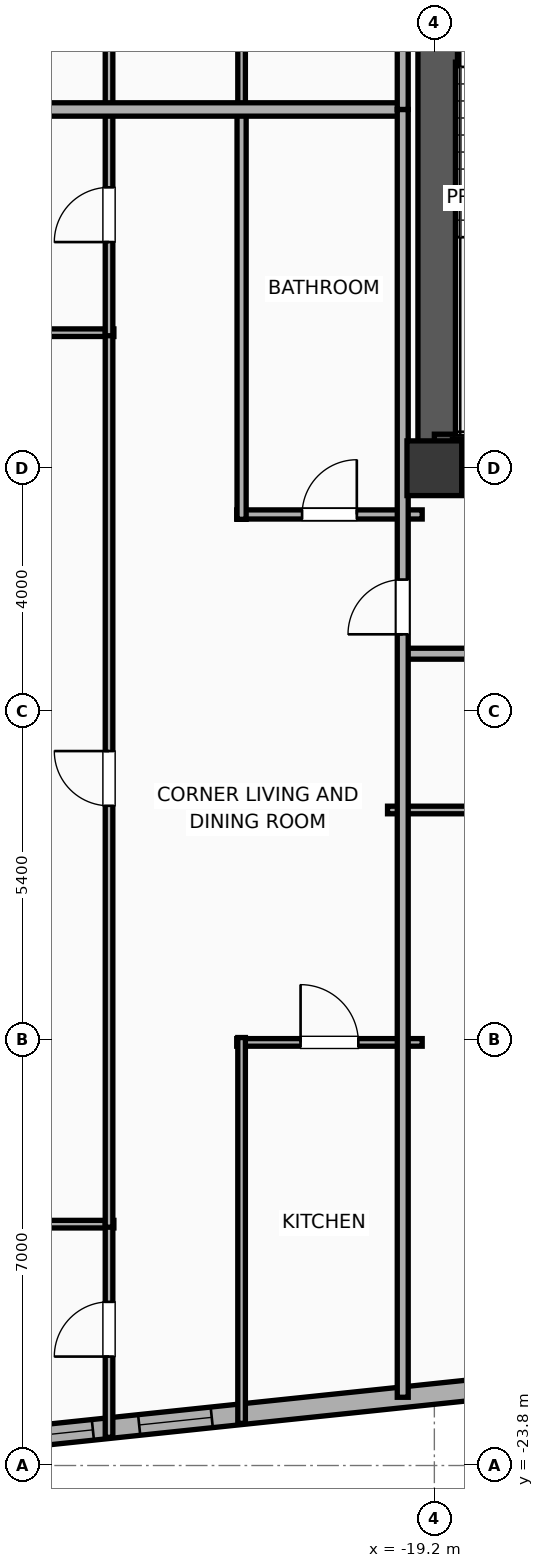
"""IFC4 building model, lengths in metres.
Left out: names, types, materials, properties, quantities, classifications, styles, units other than length and angle.
Written with IfcOpenShell. Run it as: python <this file> out.ifc"""

import sys

from ifc_helpers import new_model, si_unit, direction, frame, frame_2d, origin, origin_2d, place, context, subcontext, project, spatial, rectangle, extrude, element, fill, save


model = new_model("IFC4")
c1 = context("Model", 3, precision=1e-05, world=origin(), true_north=direction((0.0, 1.0)))
c2 = subcontext(c1, "Body", "Model", "MODEL_VIEW")
j1 = project(units=[si_unit("LENGTHUNIT", "METRE"), si_unit("PLANEANGLEUNIT", "RADIAN")], contexts=[c1])
p1 = place(None, origin())
s1 = spatial("IfcSite", under=j1, at=p1, CompositionType="ELEMENT")
p2 = place(p1, origin())
s2 = spatial("IfcBuilding", under=s1, at=p2, CompositionType="ELEMENT")
p3 = place(p2, frame((0.0, 0.0, 156.0)))
s3 = spatial("IfcBuildingStorey", under=s2, at=p3, CompositionType="ELEMENT", Elevation=156.0)
p4 = place(p3, frame((-19.2, -7.4, 0.0), z_axis=(0.0, 0.0, 1.0), x_axis=(1.0, 0.0, 0.0)))
e1 = element("IfcColumn", 1, at=p4, inside=s3, PredefinedType="COLUMN", context=c2, shape_type="SweptSolid", body=[
    extrude(rectangle(XDim=0.9, YDim=0.9, at=origin_2d()), origin(), (0.0, 0.0, 1.0), 3.9),
])
p5 = place(p3, frame((-19.425, -7.4, 0.0), z_axis=(0.0, 0.0, 1.0), x_axis=(1.0, 0.0, 0.0)))
e2 = element("IfcWall", 2, at=p5, inside=s3, PredefinedType="SHEAR", context=c2, shape_type="SweptSolid", body=[
    extrude(rectangle(XDim=7.25, YDim=0.45, at=frame_2d((3.625, 0.0))), origin(), (0.0, 0.0, 1.0), 3.65),
])
p6 = place(p3, frame((-19.145, -7.4, 0.0), z_axis=(0.0, 0.0, 1.0), x_axis=(0.0, 1.0, 0.0)))
e3 = element("IfcWall", 3, at=p6, inside=s3, PredefinedType="SHEAR", context=c2, shape_type="SweptSolid", body=[
    extrude(rectangle(XDim=14.8, YDim=0.65, at=frame_2d((7.4, 0.0))), origin(), (0.0, 0.0, 1.0), 3.65),
])
p7 = place(p3, frame((-19.2, -6.965, 0.0), z_axis=(0.0, 0.0, 1.0), x_axis=(1.0, 0.0, 0.0)))
e4 = element("IfcWall", 4, at=p7, inside=s3, PredefinedType="SOLIDWALL", context=c2, shape_type="SweptSolid", body=[
    extrude(rectangle(XDim=3.46, YDim=0.25, at=frame_2d((1.73, 0.0))), origin(), (0.0, 0.0, 1.0), 3.65),
])
p8 = place(p3, frame((24.756, -18.003, 0.0), z_axis=(0.0, 0.0, 1.0), x_axis=(-0.99452160744, -0.104531202687, 0.0)))
e5 = element("IfcWall", 5, at=p8, inside=s3, PredefinedType="ELEMENTEDWALL", context=c2, shape_type="SweptSolid", body=[
    extrude(rectangle(XDim=51.967, YDim=0.34, at=frame_2d((25.983, 0.0))), origin(), (0.0, 0.0, 1.0), 3.65),
])
p9 = place(p8, frame((25.633, 0.0, 0.75)))
e6 = element("IfcOpeningElement", 6, at=p9, cuts=e5, PredefinedType="OPENING", context=c2, shape_type="SweptSolid", body=[
    extrude(rectangle(XDim=2.4, YDim=2.1, at=frame_2d((1.2, 1.05))), frame((0.0, 0.18, 0.0), z_axis=(0.0, -1.0, 0.0), x_axis=(1.0, 0.0, 0.0)), (0.0, 0.0, 1.0), 0.36),
])
p10 = place(p8, frame((42.369, 0.0, 0.75)))
e7 = element("IfcOpeningElement", 7, at=p10, cuts=e5, PredefinedType="OPENING", context=c2, shape_type="SweptSolid", body=[
    extrude(rectangle(XDim=1.2, YDim=2.05, at=frame_2d((0.6, 1.025))), frame((0.0, 0.18, 0.0), z_axis=(0.0, -1.0, 0.0), x_axis=(1.0, 0.0, 0.0)), (0.0, 0.0, 1.0), 0.36),
])
p11 = place(p8, frame((34.085, 0.0, 0.75)))
e8 = element("IfcOpeningElement", 8, at=p11, cuts=e5, PredefinedType="OPENING", context=c2, shape_type="SweptSolid", body=[
    extrude(rectangle(XDim=1.2, YDim=2.05, at=frame_2d((0.6, 1.025))), frame((0.0, 0.18, 0.0), z_axis=(0.0, -1.0, 0.0), x_axis=(1.0, 0.0, 0.0)), (0.0, 0.0, 1.0), 0.36),
])
p12 = place(p8, frame((36.993, 0.0, 0.75)))
e9 = element("IfcOpeningElement", 9, at=p12, cuts=e5, PredefinedType="OPENING", context=c2, shape_type="SweptSolid", body=[
    extrude(rectangle(XDim=1.2, YDim=2.05, at=frame_2d((0.6, 1.025))), frame((0.0, 0.18, 0.0), z_axis=(0.0, -1.0, 0.0), x_axis=(1.0, 0.0, 0.0)), (0.0, 0.0, 1.0), 0.36),
])
p13 = place(p8, frame((14.397, 0.0, 0.75)))
e10 = element("IfcOpeningElement", 10, at=p13, cuts=e5, PredefinedType="OPENING", context=c2, shape_type="SweptSolid", body=[
    extrude(rectangle(XDim=1.2, YDim=2.05, at=frame_2d((0.6, 1.025))), frame((0.0, 0.18, 0.0), z_axis=(0.0, -1.0, 0.0), x_axis=(1.0, 0.0, 0.0)), (0.0, 0.0, 1.0), 0.36),
])
p14 = place(p8, frame((11.489, 0.0, 0.75)))
e11 = element("IfcOpeningElement", 11, at=p14, cuts=e5, PredefinedType="OPENING", context=c2, shape_type="SweptSolid", body=[
    extrude(rectangle(XDim=1.2, YDim=2.05, at=frame_2d((0.6, 1.025))), frame((0.0, 0.18, 0.0), z_axis=(0.0, -1.0, 0.0), x_axis=(1.0, 0.0, 0.0)), (0.0, 0.0, 1.0), 0.36),
])
p15 = place(p8, frame((8.521, 0.0, 0.75)))
e12 = element("IfcOpeningElement", 12, at=p15, cuts=e5, PredefinedType="OPENING", context=c2, shape_type="SweptSolid", body=[
    extrude(rectangle(XDim=1.2, YDim=2.05, at=frame_2d((0.6, 1.025))), frame((0.0, 0.18, 0.0), z_axis=(0.0, -1.0, 0.0), x_axis=(1.0, 0.0, 0.0)), (0.0, 0.0, 1.0), 0.36),
])
p16 = place(p8, frame((5.582, 0.0, 0.75)))
e13 = element("IfcOpeningElement", 13, at=p16, cuts=e5, PredefinedType="OPENING", context=c2, shape_type="SweptSolid", body=[
    extrude(rectangle(XDim=1.2, YDim=2.05, at=frame_2d((0.6, 1.025))), frame((0.0, 0.18, 0.0), z_axis=(0.0, -1.0, 0.0), x_axis=(1.0, 0.0, 0.0)), (0.0, 0.0, 1.0), 0.36),
])
p17 = place(p8, frame((29.313, 0.0, 0.75)))
e14 = element("IfcOpeningElement", 14, at=p17, cuts=e5, PredefinedType="OPENING", context=c2, shape_type="SweptSolid", body=[
    extrude(rectangle(XDim=1.2, YDim=2.05, at=frame_2d((0.6, 1.025))), frame((0.0, 0.18, 0.0), z_axis=(0.0, -1.0, 0.0), x_axis=(1.0, 0.0, 0.0)), (0.0, 0.0, 1.0), 0.36),
])
p18 = place(p8, frame((22.248, 0.0, 0.75)))
e15 = element("IfcOpeningElement", 15, at=p18, cuts=e5, PredefinedType="OPENING", context=c2, shape_type="SweptSolid", body=[
    extrude(rectangle(XDim=1.2, YDim=2.05, at=frame_2d((0.6, 1.025))), frame((0.0, 0.18, 0.0), z_axis=(0.0, -1.0, 0.0), x_axis=(1.0, 0.0, 0.0)), (0.0, 0.0, 1.0), 0.36),
])
p19 = place(p8, frame((18.186, 0.0, 0.75)))
e16 = element("IfcOpeningElement", 16, at=p19, cuts=e5, PredefinedType="OPENING", context=c2, shape_type="SweptSolid", body=[
    extrude(rectangle(XDim=1.2, YDim=2.05, at=frame_2d((0.6, 1.025))), frame((0.0, 0.18, 0.0), z_axis=(0.0, -1.0, 0.0), x_axis=(1.0, 0.0, 0.0)), (0.0, 0.0, 1.0), 0.36),
])
p20 = place(p8, frame((47.879, 0.0, 0.75)))
e17 = element("IfcOpeningElement", 17, at=p20, cuts=e5, PredefinedType="OPENING", context=c2, shape_type="SweptSolid", body=[
    extrude(rectangle(XDim=1.2, YDim=2.05, at=frame_2d((0.6, 1.025))), frame((0.0, 0.18, 0.0), z_axis=(0.0, -1.0, 0.0), x_axis=(1.0, 0.0, 0.0)), (0.0, 0.0, 1.0), 0.36),
])
p21 = place(p8, frame((49.844, 0.0, 0.75)))
e18 = element("IfcOpeningElement", 18, at=p21, cuts=e5, PredefinedType="OPENING", context=c2, shape_type="SweptSolid", body=[
    extrude(rectangle(XDim=1.2, YDim=2.05, at=frame_2d((0.6, 1.025))), frame((0.0, 0.18, 0.0), z_axis=(0.0, -1.0, 0.0), x_axis=(1.0, 0.0, 0.0)), (0.0, 0.0, 1.0), 0.36),
])
p22 = place(p3, frame((-19.97, -13.02, 0.0), z_axis=(0.0, 0.0, 1.0), x_axis=(1.0, 0.0, 0.0)))
e19 = element("IfcWall", 19, at=p22, inside=s3, PredefinedType="PARTITIONING", context=c2, shape_type="SweptSolid", body=[
    extrude(rectangle(XDim=2.63, YDim=0.125, at=frame_2d((1.315, 0.0))), origin(), (0.0, 0.0, 1.0), 3.65),
])
p23 = place(p3, frame((-19.75, -10.45, 0.0), z_axis=(0.0, 0.0, 1.0), x_axis=(1.0, 0.0, 0.0)))
e20 = element("IfcWall", 20, at=p23, inside=s3, PredefinedType="PARTITIONING", context=c2, shape_type="SweptSolid", body=[
    extrude(rectangle(XDim=11.67, YDim=0.18, at=frame_2d((5.835, 0.0))), origin(), (0.0, 0.0, 1.0), 3.65),
])
p24 = place(p23, frame((2.664, 0.0, 0.0)))
e21 = element("IfcOpeningElement", 21, at=p24, cuts=e20, PredefinedType="OPENING", context=c2, shape_type="SweptSolid", body=[
    extrude(rectangle(XDim=0.9, YDim=2.05, at=frame_2d((0.45, 1.025))), frame((0.0, 0.1, 0.0), z_axis=(0.0, -1.0, 0.0), x_axis=(1.0, 0.0, 0.0)), (0.0, 0.0, 1.0), 0.2),
])
p25 = place(p23, frame((9.404, 0.0, 0.0)))
e22 = element("IfcOpeningElement", 22, at=p25, cuts=e20, PredefinedType="OPENING", context=c2, shape_type="SweptSolid", body=[
    extrude(rectangle(XDim=1.15, YDim=2.05, at=frame_2d((0.575, 1.025))), frame((0.0, 0.1, 0.0), z_axis=(0.0, -1.0, 0.0), x_axis=(1.0, 0.0, 0.0)), (0.0, 0.0, 1.0), 0.2),
])
p26 = place(p3, frame((-31.123, -19.831, 0.0), z_axis=(0.0, 0.0, 1.0), x_axis=(1.0, 0.0, 0.0)))
e23 = element("IfcWall", 23, at=p26, inside=s3, PredefinedType="PARTITIONING", context=c2, shape_type="SweptSolid", body=[
    extrude(rectangle(XDim=6.653, YDim=0.125, at=frame_2d((3.326, 0.0))), origin(), (0.0, 0.0, 1.0), 3.65),
])
p27 = place(p3, frame((-32.664, -5.171, 0.0), z_axis=(0.0, 0.0, 1.0), x_axis=(1.0, 0.0, 0.0)))
e24 = element("IfcWall", 24, at=p27, inside=s3, PredefinedType="PARTITIONING", context=c2, shape_type="SweptSolid", body=[
    extrude(rectangle(XDim=8.194, YDim=0.125, at=frame_2d((4.097, 0.0))), origin(), (0.0, 0.0, 1.0), 3.65),
])
p28 = place(p3, frame((-24.55, -23.336, 0.0), z_axis=(0.0, 0.0, 1.0), x_axis=(0.0, 1.0, 0.0)))
e25 = element("IfcWall", 25, at=p28, inside=s3, PredefinedType="PARTITIONING", context=c2, shape_type="SweptSolid", body=[
    extrude(rectangle(XDim=3.555, YDim=0.125, at=frame_2d((1.778, 0.0))), origin(), (0.0, 0.0, 1.0), 3.65),
])
p29 = place(p28, frame((1.328, 0.0, 0.0)))
e26 = element("IfcOpeningElement", 26, at=p29, cuts=e25, PredefinedType="OPENING", context=c2, shape_type="SweptSolid", body=[
    extrude(rectangle(XDim=0.9, YDim=2.05, at=frame_2d((0.45, 1.025))), frame((0.0, 0.073, 0.0), z_axis=(0.0, -1.0, 0.0), x_axis=(1.0, 0.0, 0.0)), (0.0, 0.0, 1.0), 0.145),
])
p30 = place(p3, frame((-24.55, -19.881, 0.0), z_axis=(0.0, 0.0, 1.0), x_axis=(0.0, 1.0, 0.0)))
e27 = element("IfcWall", 27, at=p30, inside=s3, PredefinedType="PARTITIONING", context=c2, shape_type="SweptSolid", body=[
    extrude(rectangle(XDim=14.76, YDim=0.125, at=frame_2d((7.38, 0.0))), origin(), (0.0, 0.0, 1.0), 3.65),
])
p31 = place(p30, frame((6.93, 0.0, 0.0)))
e28 = element("IfcOpeningElement", 28, at=p31, cuts=e27, PredefinedType="OPENING", context=c2, shape_type="SweptSolid", body=[
    extrude(rectangle(XDim=0.9, YDim=2.05, at=frame_2d((0.45, 1.025))), frame((0.0, 0.073, 0.0), z_axis=(0.0, -1.0, 0.0), x_axis=(1.0, 0.0, 0.0)), (0.0, 0.0, 1.0), 0.145),
])
p32 = place(p3, frame((-24.55, -5.221, 0.0), z_axis=(0.0, 0.0, 1.0), x_axis=(0.0, 1.0, 0.0)))
e29 = element("IfcWall", 29, at=p32, inside=s3, PredefinedType="PARTITIONING", context=c2, shape_type="SweptSolid", body=[
    extrude(rectangle(XDim=3.783, YDim=0.125, at=frame_2d((1.892, 0.0))), origin(), (0.0, 0.0, 1.0), 3.65),
])
p33 = place(p32, frame((1.541, 0.0, 0.0)))
e30 = element("IfcOpeningElement", 30, at=p33, cuts=e29, PredefinedType="OPENING", context=c2, shape_type="SweptSolid", body=[
    extrude(rectangle(XDim=0.9, YDim=2.05, at=frame_2d((0.45, 1.025))), frame((0.0, 0.073, 0.0), z_axis=(0.0, -1.0, 0.0), x_axis=(1.0, 0.0, 0.0)), (0.0, 0.0, 1.0), 0.145),
])
p34 = place(p3, frame((-22.45, -16.842, 0.0), z_axis=(0.0, 0.0, 1.0), x_axis=(1.0, 0.0, 0.0)))
e31 = element("IfcWall", 31, at=p34, inside=s3, PredefinedType="PARTITIONING", context=c2, shape_type="SweptSolid", body=[
    extrude(rectangle(XDim=3.05, YDim=0.125, at=frame_2d((1.525, 0.0))), origin(), (0.0, 0.0, 1.0), 3.65),
])
p35 = place(p34, frame((1.05, 0.0, 0.0)))
e32 = element("IfcOpeningElement", 32, at=p35, cuts=e31, PredefinedType="OPENING", context=c2, shape_type="SweptSolid", body=[
    extrude(rectangle(XDim=0.95, YDim=2.05, at=frame_2d((0.475, 1.025))), frame((0.0, 0.073, 0.0), z_axis=(0.0, -1.0, 0.0), x_axis=(1.0, 0.0, 0.0)), (0.0, 0.0, 1.0), 0.145),
])
p36 = place(p3, frame((-22.45, -8.16, 0.0), z_axis=(0.0, 0.0, 1.0), x_axis=(1.0, 0.0, 0.0)))
e33 = element("IfcWall", 33, at=p36, inside=s3, PredefinedType="PLUMBINGWALL", context=c2, shape_type="SweptSolid", body=[
    extrude(rectangle(XDim=3.05, YDim=0.15, at=frame_2d((1.525, 0.0))), origin(), (0.0, 0.0, 1.0), 3.04),
])
p37 = place(p36, frame((1.075, 0.0, 0.0)))
e34 = element("IfcOpeningElement", 34, at=p37, cuts=e33, PredefinedType="OPENING", context=c2, shape_type="SweptSolid", body=[
    extrude(rectangle(XDim=0.9, YDim=2.05, at=frame_2d((0.45, 1.025))), frame((0.0, 0.085, 0.0), z_axis=(0.0, -1.0, 0.0), x_axis=(1.0, 0.0, 0.0)), (0.0, 0.0, 1.0), 0.17),
])
p38 = place(p3, frame((-22.37, -23.107, 0.0), z_axis=(0.0, 0.0, 1.0), x_axis=(0.0, 1.0, 0.0)))
e35 = element("IfcWall", 35, at=p38, inside=s3, PredefinedType="PARTITIONING", context=c2, shape_type="SweptSolid", body=[
    extrude(rectangle(XDim=6.345, YDim=0.125, at=frame_2d((3.173, 0.0))), origin(), (0.0, 0.0, 1.0), 3.65),
])
p39 = place(p3, frame((-22.37, -8.24, 0.0), z_axis=(0.0, 0.0, 1.0), x_axis=(0.0, 1.0, 0.0)))
e36 = element("IfcWall", 36, at=p39, inside=s3, PredefinedType="PLUMBINGWALL", context=c2, shape_type="SweptSolid", body=[
    extrude(rectangle(XDim=6.72, YDim=0.15, at=frame_2d((3.36, 0.0))), origin(), (0.0, 0.0, 1.0), 3.65),
])
p40 = place(p3, frame((-24.55, -1.562, 0.0), z_axis=(0.0, 0.0, 1.0), x_axis=(0.0, 1.0, 0.0)))
e37 = element("IfcWall", 37, at=p40, inside=s3, PredefinedType="PARTITIONING", context=c2, shape_type="SweptSolid", body=[
    extrude(rectangle(XDim=3.335, YDim=0.125, at=frame_2d((1.668, 0.0))), origin(), (0.0, 0.0, 1.0), 3.65),
])
p41 = place(p40, frame((1.119, 0.0, 0.0)))
e38 = element("IfcOpeningElement", 38, at=p41, cuts=e37, PredefinedType="OPENING", context=c2, shape_type="SweptSolid", body=[
    extrude(rectangle(XDim=0.9, YDim=2.05, at=frame_2d((0.45, 1.025))), frame((0.0, 0.073, 0.0), z_axis=(0.0, -1.0, 0.0), x_axis=(1.0, 0.0, 0.0)), (0.0, 0.0, 1.0), 0.145),
])
p42 = place(p3, frame((-22.37, -1.48, 0.0), z_axis=(0.0, 0.0, 1.0), x_axis=(0.0, 1.0, 0.0)))
e39 = element("IfcWall", 39, at=p42, inside=s3, PredefinedType="PARTITIONING", context=c2, shape_type="SweptSolid", body=[
    extrude(rectangle(XDim=6.72, YDim=0.125, at=frame_2d((3.36, 0.0))), origin(), (0.0, 0.0, 1.0), 3.65),
])
p43 = place(p3, frame((-19.72, -1.5, 0.0), z_axis=(0.0, 0.0, 1.0), x_axis=(-1.0, 0.0, 0.0)))
e40 = element("IfcWall", 40, at=p43, inside=s3, PredefinedType="PARTITIONING", context=c2, shape_type="SweptSolid", body=[
    extrude(rectangle(XDim=13.179, YDim=0.22, at=frame_2d((6.589, 0.0))), origin(), (0.0, 0.0, 1.0), 3.65),
])
p44 = place(p3, frame((-19.72, -22.678, 0.0), z_axis=(0.0, 0.0, 1.0), x_axis=(0.0, 1.0, 0.0)))
e41 = element("IfcWall", 41, at=p44, inside=s3, PredefinedType="PARTITIONING", context=c2, shape_type="SweptSolid", body=[
    extrude(rectangle(XDim=21.178, YDim=0.18, at=frame_2d((10.589, 0.0))), origin(), (0.0, 0.0, 1.0), 3.65),
])
p45 = place(p44, frame((12.547, 0.0, 0.0)))
e42 = element("IfcOpeningElement", 42, at=p45, cuts=e41, PredefinedType="OPENING", context=c2, shape_type="SweptSolid", body=[
    extrude(rectangle(XDim=0.9, YDim=2.05, at=frame_2d((0.45, 1.025))), frame((0.0, 0.1, 0.0), z_axis=(0.0, -1.0, 0.0), x_axis=(1.0, 0.0, 0.0)), (0.0, 0.0, 1.0), 0.2),
])
p46 = place(p3, frame((-19.72, -1.5, 0.0), z_axis=(0.0, 0.0, 1.0), x_axis=(0.0, 1.0, 0.0)))
e43 = element("IfcWall", 43, at=p46, inside=s3, PredefinedType="PARTITIONING", context=c2, shape_type="SweptSolid", body=[
    extrude(rectangle(XDim=19.505, YDim=0.18, at=frame_2d((9.752, 0.0))), origin(), (0.0, 0.0, 1.0), 3.04),
])
p47 = place(p46, frame((10.73, 0.0, 0.0)))
e44 = element("IfcOpeningElement", 44, at=p47, cuts=e43, PredefinedType="OPENING", context=c2, shape_type="SweptSolid", body=[
    extrude(rectangle(XDim=0.9, YDim=2.05, at=frame_2d((0.45, 1.025))), frame((0.0, 0.1, 0.0), z_axis=(0.0, -1.0, 0.0), x_axis=(1.0, 0.0, 0.0)), (0.0, 0.0, 1.0), 0.2),
])
p48 = place(p20, origin())
e45 = element("IfcWindow", 45, at=p48, inside=s3, PartitioningType="SINGLE_PANEL", PredefinedType="WINDOW", context=c2, shape_type="SweptSolid", body=[
    extrude(rectangle(XDim=1.2, YDim=2.05, at=frame_2d((0.6, 1.025))), frame((0.0, 0.03, 0.0), z_axis=(0.0, -1.0, 0.0), x_axis=(1.0, 0.0, 0.0)), (0.0, 0.0, 1.0), 0.06),
])
fill(e17, e45)
p49 = place(p21, origin())
e46 = element("IfcWindow", 46, at=p49, inside=s3, PartitioningType="SINGLE_PANEL", PredefinedType="WINDOW", context=c2, shape_type="SweptSolid", body=[
    extrude(rectangle(XDim=1.2, YDim=2.05, at=frame_2d((0.6, 1.025))), frame((0.0, 0.03, 0.0), z_axis=(0.0, -1.0, 0.0), x_axis=(1.0, 0.0, 0.0)), (0.0, 0.0, 1.0), 0.06),
])
fill(e18, e46)
p50 = place(p29, origin())
e47 = element("IfcDoor", 47, at=p50, inside=s3, OperationType="SINGLE_SWING_LEFT", PredefinedType="DOOR", context=c2, shape_type="SweptSolid", body=[
    extrude(rectangle(XDim=0.9, YDim=2.05, at=frame_2d((0.45, 1.025))), frame((0.0, 0.025, 0.0), z_axis=(0.0, -1.0, 0.0), x_axis=(1.0, 0.0, 0.0)), (0.0, 0.0, 1.0), 0.05),
])
fill(e26, e47)
p51 = place(p31, origin())
e48 = element("IfcDoor", 48, at=p51, inside=s3, OperationType="SINGLE_SWING_RIGHT", PredefinedType="DOOR", context=c2, shape_type="SweptSolid", body=[
    extrude(rectangle(XDim=0.9, YDim=2.05, at=frame_2d((0.45, 1.025))), frame((0.0, 0.025, 0.0), z_axis=(0.0, -1.0, 0.0), x_axis=(1.0, 0.0, 0.0)), (0.0, 0.0, 1.0), 0.05),
])
fill(e28, e48)
p52 = place(p33, origin())
e49 = element("IfcDoor", 49, at=p52, inside=s3, OperationType="SINGLE_SWING_LEFT", PredefinedType="DOOR", context=c2, shape_type="SweptSolid", body=[
    extrude(rectangle(XDim=0.9, YDim=2.05, at=frame_2d((0.45, 1.025))), frame((0.0, 0.025, 0.0), z_axis=(0.0, -1.0, 0.0), x_axis=(1.0, 0.0, 0.0)), (0.0, 0.0, 1.0), 0.05),
])
fill(e30, e49)
p53 = place(p35, origin())
e50 = element("IfcDoor", 50, at=p53, inside=s3, OperationType="SINGLE_SWING_LEFT", PredefinedType="DOOR", context=c2, shape_type="SweptSolid", body=[
    extrude(rectangle(XDim=0.95, YDim=2.05, at=frame_2d((0.475, 1.025))), frame((0.0, 0.025, 0.0), z_axis=(0.0, -1.0, 0.0), x_axis=(1.0, 0.0, 0.0)), (0.0, 0.0, 1.0), 0.05),
])
fill(e32, e50)
p54 = place(p37, origin())
e51 = element("IfcDoor", 51, at=p54, inside=s3, OperationType="SINGLE_SWING_RIGHT", PredefinedType="DOOR", context=c2, shape_type="SweptSolid", body=[
    extrude(rectangle(XDim=0.9, YDim=2.05, at=frame_2d((0.45, 1.025))), frame((0.0, 0.025, 0.0), z_axis=(0.0, -1.0, 0.0), x_axis=(1.0, 0.0, 0.0)), (0.0, 0.0, 1.0), 0.05),
])
fill(e34, e51)
p55 = place(p45, origin())
e52 = element("IfcDoor", 52, at=p55, inside=s3, OperationType="SINGLE_SWING_LEFT", PredefinedType="DOOR", context=c2, shape_type="SweptSolid", body=[
    extrude(rectangle(XDim=0.9, YDim=2.05, at=frame_2d((0.45, 1.025))), frame((0.0, 0.025, 0.0), z_axis=(0.0, -1.0, 0.0), x_axis=(1.0, 0.0, 0.0)), (0.0, 0.0, 1.0), 0.05),
])
fill(e42, e52)
save(model, sys.argv[1])
